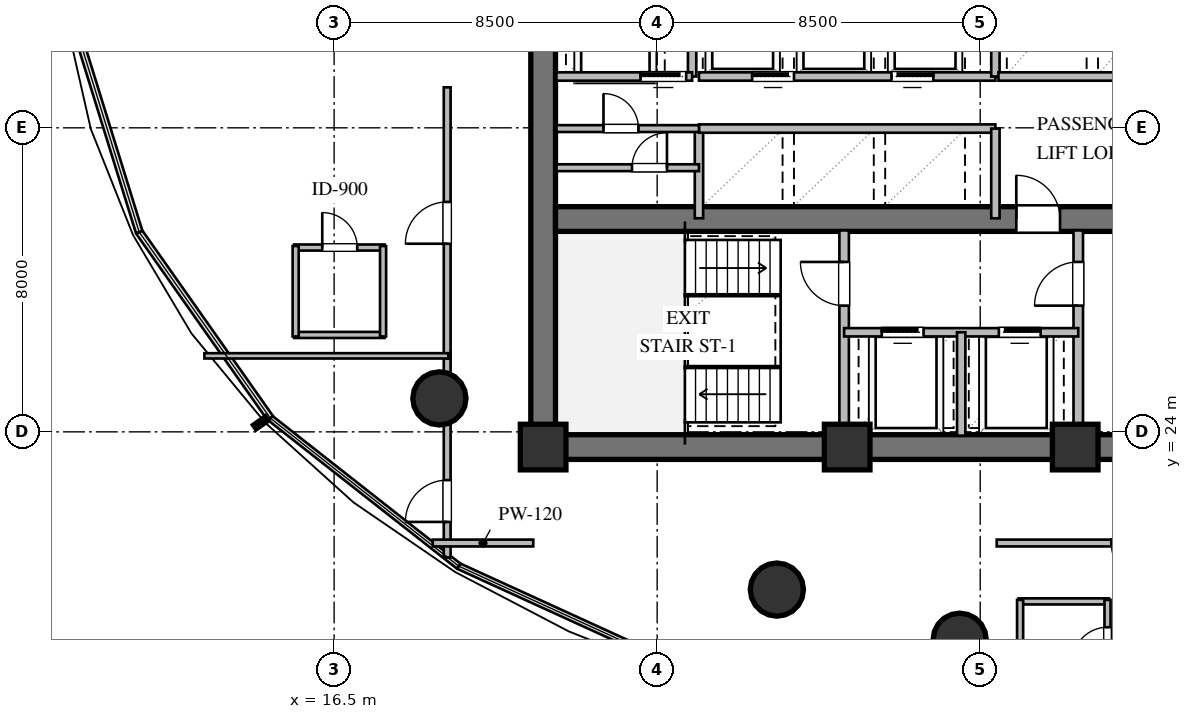
"""IFC4 building model, lengths in metres.
Left out: names, types, materials, properties, quantities, classifications, styles, units other than length and angle.
Written with IfcOpenShell. Run it as: python <this file> out.ifc"""

import sys

from ifc_helpers import new_model, si_unit, direction, frame, frame_2d, origin, origin_2d, place, context, subcontext, project, spatial, rectangle, circle, extrude, element, fill, save


model = new_model("IFC4")
c1 = context("Model", 3, precision=1e-05, world=origin(), true_north=direction((0.0, 1.0)))
c2 = subcontext(c1, "Body", "Model", "MODEL_VIEW")
j1 = project(units=[si_unit("LENGTHUNIT", "METRE"), si_unit("PLANEANGLEUNIT", "RADIAN")], contexts=[c1])
p1 = place(None, origin())
s1 = spatial("IfcSite", under=j1, at=p1, CompositionType="ELEMENT")
p2 = place(p1, origin())
s2 = spatial("IfcBuilding", under=s1, at=p2, CompositionType="ELEMENT")
p3 = place(p2, frame((0.0, 0.0, 24.0)))
s3 = spatial("IfcBuildingStorey", under=s2, at=p3, CompositionType="ELEMENT", Elevation=24.0)
p4 = place(p3, frame((21.675, 23.6, 0.0), z_axis=(0.0, 0.0, 1.0), x_axis=(1.0, 0.0, 0.0)))
e1 = element("IfcWall", 1, at=p4, inside=s3, PredefinedType="SHEAR", context=c2, shape_type="SweptSolid", body=[
    extrude(rectangle(XDim=22.65, YDim=0.65, at=frame_2d((11.325, 0.0))), origin(), (0.0, 0.0, 1.0), 3.36),
])
p5 = place(p3, frame((22.0, 23.925, 0.0), z_axis=(0.0, 0.0, 1.0), x_axis=(0.0, 1.0, 0.0)))
e2 = element("IfcWall", 2, at=p5, inside=s3, PredefinedType="SHEAR", context=c2, shape_type="SweptSolid", body=[
    extrude(rectangle(XDim=12.15, YDim=0.65, at=frame_2d((6.075, 0.0))), origin(), (0.0, 0.0, 1.0), 3.36),
])
p6 = place(p3, frame((22.325, 29.6, 0.0), z_axis=(0.0, 0.0, 1.0), x_axis=(1.0, 0.0, 0.0)))
e3 = element("IfcWall", 3, at=p6, inside=s3, PredefinedType="SHEAR", context=c2, shape_type="SweptSolid", body=[
    extrude(rectangle(XDim=21.35, YDim=0.65, at=frame_2d((10.675, 0.0))), origin(), (0.0, 0.0, 1.0), 3.36),
])
p7 = place(p6, frame((12.125, 0.0, 0.0)))
e4 = element("IfcOpeningElement", 4, at=p7, cuts=e3, PredefinedType="OPENING", context=c2, shape_type="SweptSolid", body=[
    extrude(rectangle(XDim=1.15, YDim=2.1, at=frame_2d((0.575, 1.05))), frame((0.0, 0.335, 0.0), z_axis=(0.0, -1.0, 0.0), x_axis=(1.0, 0.0, 0.0)), (0.0, 0.0, 1.0), 0.67),
])
for number, where, z_axis, x_axis in (
    (5, (22.0, 23.6, 0.0), (0.0, 0.0, 1.0), (1.0, 0.0, 0.0)),
    (6, (30.0, 23.6, 0.0), (0.0, 0.0, 1.0), (1.0, 0.0, 0.0)),
    (7, (36.0, 23.6, 0.0), (0.0, 0.0, 1.0), (1.0, 0.0, 0.0)),
):
    element("IfcColumn", number, at=place(p3, frame(where, z_axis=z_axis, x_axis=x_axis)), inside=s3, PredefinedType="COLUMN", context=c2, shape_type="SweptSolid", body=[
        extrude(rectangle(XDim=1.2, YDim=1.2, at=origin_2d()), origin(), (0.0, 0.0, 1.0), 3.6),
    ])
for number, where, z_axis, x_axis in (
    (8, (19.27, 24.88, 0.0), (0.0, 0.0, 1.0), (1.0, 0.0, 0.0)),
    (9, (28.15, 19.85, 0.0), (0.0, 0.0, 1.0), (1.0, 0.0, 0.0)),
    (10, (32.96, 18.53, 0.0), (0.0, 0.0, 1.0), (1.0, 0.0, 0.0)),
):
    element("IfcColumn", number, at=place(p3, frame(where, z_axis=z_axis, x_axis=x_axis)), inside=s3, PredefinedType="COLUMN", context=c2, shape_type="SweptSolid", body=[
        extrude(circle(Radius=0.7, at=origin_2d()), origin(), (0.0, 0.0, 1.0), 3.6),
    ])
p8 = place(p3, frame((29.92, 23.9, 0.0), z_axis=(0.0, 0.0, 1.0), x_axis=(0.0, 1.0, 0.0)))
e11 = element("IfcWall", 11, at=p8, inside=s3, PredefinedType="SOLIDWALL", context=c2, shape_type="SweptSolid", body=[
    extrude(rectangle(XDim=5.4, YDim=0.25, at=frame_2d((2.7, 0.0))), origin(), (0.0, 0.0, 1.0), 3.36),
])
p9 = place(p8, frame((3.421, 0.0, 0.0)))
e12 = element("IfcOpeningElement", 12, at=p9, cuts=e11, PredefinedType="OPENING", context=c2, shape_type="SweptSolid", body=[
    extrude(rectangle(XDim=1.15, YDim=2.1, at=frame_2d((0.575, 1.05))), frame((0.0, 0.135, 0.0), z_axis=(0.0, -1.0, 0.0), x_axis=(1.0, 0.0, 0.0)), (0.0, 0.0, 1.0), 0.27),
])
p10 = place(p3, frame((36.08, 23.9, 0.0), z_axis=(0.0, 0.0, 1.0), x_axis=(0.0, 1.0, 0.0)))
e13 = element("IfcWall", 13, at=p10, inside=s3, PredefinedType="SOLIDWALL", context=c2, shape_type="SweptSolid", body=[
    extrude(rectangle(XDim=5.4, YDim=0.25, at=frame_2d((2.7, 0.0))), origin(), (0.0, 0.0, 1.0), 3.36),
])
p11 = place(p10, frame((3.421, 0.0, 0.0)))
e14 = element("IfcOpeningElement", 14, at=p11, cuts=e13, PredefinedType="OPENING", context=c2, shape_type="SweptSolid", body=[
    extrude(rectangle(XDim=1.15, YDim=2.1, at=frame_2d((0.575, 1.05))), frame((0.0, 0.135, 0.0), z_axis=(0.0, -1.0, 0.0), x_axis=(1.0, 0.0, 0.0)), (0.0, 0.0, 1.0), 0.27),
])
p12 = place(p3, frame((29.92, 26.62, 0.0), z_axis=(0.0, 0.0, 1.0), x_axis=(1.0, 0.0, 0.0)))
e15 = element("IfcWall", 15, at=p12, inside=s3, PredefinedType="SOLIDWALL", context=c2, shape_type="SweptSolid", body=[
    extrude(rectangle(XDim=6.16, YDim=0.22, at=frame_2d((3.08, 0.0))), origin(), (0.0, 0.0, 1.0), 3.36),
])
p13 = place(p12, frame((0.99, 0.0, 0.0)))
e16 = element("IfcOpeningElement", 16, at=p13, cuts=e15, PredefinedType="OPENING", context=c2, shape_type="SweptSolid", body=[
    extrude(rectangle(XDim=1.1, YDim=2.1, at=frame_2d((0.55, 1.05))), frame((0.0, 0.12, 0.0), z_axis=(0.0, -1.0, 0.0), x_axis=(1.0, 0.0, 0.0)), (0.0, 0.0, 1.0), 0.24),
])
p14 = place(p12, frame((4.07, 0.0, 0.0)))
e17 = element("IfcOpeningElement", 17, at=p14, cuts=e15, PredefinedType="OPENING", context=c2, shape_type="SweptSolid", body=[
    extrude(rectangle(XDim=1.1, YDim=2.1, at=frame_2d((0.55, 1.05))), frame((0.0, 0.12, 0.0), z_axis=(0.0, -1.0, 0.0), x_axis=(1.0, 0.0, 0.0)), (0.0, 0.0, 1.0), 0.24),
])
p15 = place(p3, frame((33.0, 23.9, 0.0), z_axis=(0.0, 0.0, 1.0), x_axis=(0.0, 1.0, 0.0)))
e18 = element("IfcWall", 18, at=p15, inside=s3, PredefinedType="SOLIDWALL", context=c2, shape_type="SweptSolid", body=[
    extrude(rectangle(XDim=2.72, YDim=0.22, at=frame_2d((1.36, 0.0))), origin(), (0.0, 0.0, 1.0), 3.36),
])
p16 = place(p3, frame((25.92, 33.35, 0.0), z_axis=(0.0, 0.0, 1.0), x_axis=(0.0, 1.0, 0.0)))
e19 = element("IfcWall", 19, at=p16, inside=s3, PredefinedType="SOLIDWALL", context=c2, shape_type="SweptSolid", body=[
    extrude(rectangle(XDim=2.73, YDim=0.22, at=frame_2d((1.365, 0.0))), origin(), (0.0, 0.0, 1.0), 3.36),
])
p17 = place(p3, frame((22.35, 33.35, 0.0), z_axis=(0.0, 0.0, 1.0), x_axis=(1.0, 0.0, 0.0)))
e20 = element("IfcWall", 20, at=p17, inside=s3, PredefinedType="SOLIDWALL", context=c2, shape_type="SweptSolid", body=[
    extrude(rectangle(XDim=3.57, YDim=0.22, at=frame_2d((1.785, 0.0))), origin(), (0.0, 0.0, 1.0), 3.36),
])
p18 = place(p17, frame((2.213, 0.0, 0.0)))
e21 = element("IfcOpeningElement", 21, at=p18, cuts=e20, PredefinedType="OPENING", context=c2, shape_type="SweptSolid", body=[
    extrude(rectangle(XDim=1.2, YDim=2.1, at=frame_2d((0.6, 1.05))), frame((0.0, 0.12, 0.0), z_axis=(0.0, -1.0, 0.0), x_axis=(1.0, 0.0, 0.0)), (0.0, 0.0, 1.0), 0.24),
])
p19 = place(p3, frame((26.1, 29.62, 0.0), z_axis=(0.0, 0.0, 1.0), x_axis=(0.0, 1.0, 0.0)))
e22 = element("IfcWall", 22, at=p19, inside=s3, PredefinedType="SOLIDWALL", context=c2, shape_type="SweptSolid", body=[
    extrude(rectangle(XDim=2.36, YDim=0.22, at=frame_2d((1.18, 0.0))), origin(), (0.0, 0.0, 1.0), 3.36),
])
p20 = place(p3, frame((26.1, 31.98, 0.0), z_axis=(0.0, 0.0, 1.0), x_axis=(1.0, 0.0, 0.0)))
e23 = element("IfcWall", 23, at=p20, inside=s3, PredefinedType="SOLIDWALL", context=c2, shape_type="SweptSolid", body=[
    extrude(rectangle(XDim=7.8, YDim=0.22, at=frame_2d((3.9, 0.0))), origin(), (0.0, 0.0, 1.0), 3.36),
])
p21 = place(p3, frame((33.9, 29.62, 0.0), z_axis=(0.0, 0.0, 1.0), x_axis=(0.0, 1.0, 0.0)))
e24 = element("IfcWall", 24, at=p21, inside=s3, PredefinedType="SOLIDWALL", context=c2, shape_type="SweptSolid", body=[
    extrude(rectangle(XDim=2.36, YDim=0.22, at=frame_2d((1.18, 0.0))), origin(), (0.0, 0.0, 1.0), 3.36),
])
p22 = place(p3, frame((26.1, 33.35, 0.0), z_axis=(0.0, 0.0, 1.0), x_axis=(1.0, 0.0, 0.0)))
e25 = element("IfcWall", 25, at=p22, inside=s3, PredefinedType="SOLIDWALL", context=c2, shape_type="SweptSolid", body=[
    extrude(rectangle(XDim=7.8, YDim=0.22, at=frame_2d((3.9, 0.0))), origin(), (0.0, 0.0, 1.0), 3.36),
])
p23 = place(p22, frame((1.4, 0.0, 0.0)))
e26 = element("IfcOpeningElement", 26, at=p23, cuts=e25, PredefinedType="OPENING", context=c2, shape_type="SweptSolid", body=[
    extrude(rectangle(XDim=1.1, YDim=2.1, at=frame_2d((0.55, 1.05))), frame((0.0, 0.12, 0.0), z_axis=(0.0, -1.0, 0.0), x_axis=(1.0, 0.0, 0.0)), (0.0, 0.0, 1.0), 0.24),
])
p24 = place(p22, frame((5.066, 0.0, 0.0)))
e27 = element("IfcOpeningElement", 27, at=p24, cuts=e25, PredefinedType="OPENING", context=c2, shape_type="SweptSolid", body=[
    extrude(rectangle(XDim=1.1, YDim=2.1, at=frame_2d((0.55, 1.05))), frame((0.0, 0.12, 0.0), z_axis=(0.0, -1.0, 0.0), x_axis=(1.0, 0.0, 0.0)), (0.0, 0.0, 1.0), 0.24),
])
p25 = place(p3, frame((33.9, 33.35, 0.0), z_axis=(0.0, 0.0, 1.0), x_axis=(0.0, 1.0, 0.0)))
e28 = element("IfcWall", 28, at=p25, inside=s3, PredefinedType="SOLIDWALL", context=c2, shape_type="SweptSolid", body=[
    extrude(rectangle(XDim=2.73, YDim=0.22, at=frame_2d((1.365, 0.0))), origin(), (0.0, 0.0, 1.0), 3.36),
])
p26 = place(p3, frame((33.98, 33.35, 0.0), z_axis=(0.0, 0.0, 1.0), x_axis=(1.0, 0.0, 0.0)))
e29 = element("IfcWall", 29, at=p26, inside=s3, PredefinedType="SOLIDWALL", context=c2, shape_type="SweptSolid", body=[
    extrude(rectangle(XDim=7.54, YDim=0.22, at=frame_2d((3.77, 0.0))), origin(), (0.0, 0.0, 1.0), 3.36),
])
p27 = place(p3, frame((22.35, 30.95, 0.0), z_axis=(0.0, 0.0, 1.0), x_axis=(1.0, 0.0, 0.0)))
e30 = element("IfcWall", 30, at=p27, inside=s3, PredefinedType="PARTITIONING", context=c2, shape_type="SweptSolid", body=[
    extrude(rectangle(XDim=3.75, YDim=0.18, at=frame_2d((1.875, 0.0))), origin(), (0.0, 0.0, 1.0), 3.36),
])
p28 = place(p27, frame((1.988, 0.0, 0.0)))
e31 = element("IfcOpeningElement", 31, at=p28, cuts=e30, PredefinedType="OPENING", context=c2, shape_type="SweptSolid", body=[
    extrude(rectangle(XDim=0.92, YDim=2.1, at=frame_2d((0.46, 1.05))), frame((0.0, 0.1, 0.0), z_axis=(0.0, -1.0, 0.0), x_axis=(1.0, 0.0, 0.0)), (0.0, 0.0, 1.0), 0.2),
])
p29 = place(p3, frame((22.35, 31.98, 0.0), z_axis=(0.0, 0.0, 1.0), x_axis=(1.0, 0.0, 0.0)))
e32 = element("IfcWall", 32, at=p29, inside=s3, PredefinedType="PARTITIONING", context=c2, shape_type="SweptSolid", body=[
    extrude(rectangle(XDim=3.75, YDim=0.18, at=frame_2d((1.875, 0.0))), origin(), (0.0, 0.0, 1.0), 3.36),
])
p30 = place(p29, frame((1.238, 0.0, 0.0)))
e33 = element("IfcOpeningElement", 33, at=p30, cuts=e32, PredefinedType="OPENING", context=c2, shape_type="SweptSolid", body=[
    extrude(rectangle(XDim=0.92, YDim=2.1, at=frame_2d((0.46, 1.05))), frame((0.0, 0.1, 0.0), z_axis=(0.0, -1.0, 0.0), x_axis=(1.0, 0.0, 0.0)), (0.0, 0.0, 1.0), 0.2),
])
p31 = place(p3, frame((34.51, 19.539, 0.0), z_axis=(0.0, 0.0, 1.0), x_axis=(1.0, 0.0, 0.0)))
e34 = element("IfcWall", 34, at=p31, inside=s3, PredefinedType="PLUMBINGWALL", context=c2, shape_type="SweptSolid", body=[
    extrude(rectangle(XDim=2.38, YDim=0.16, at=frame_2d((1.19, 0.0))), origin(), (0.0, 0.0, 1.0), 3.36),
])
p32 = place(p3, frame((34.55, 17.199, 0.0), z_axis=(0.0, 0.0, 1.0), x_axis=(0.0, 1.0, 0.0)))
e35 = element("IfcWall", 35, at=p32, inside=s3, PredefinedType="PLUMBINGWALL", context=c2, shape_type="SweptSolid", body=[
    extrude(rectangle(XDim=2.38, YDim=0.16, at=frame_2d((1.19, 0.0))), origin(), (0.0, 0.0, 1.0), 3.36),
])
p33 = place(p3, frame((36.85, 17.199, 0.0), z_axis=(0.0, 0.0, 1.0), x_axis=(0.0, 1.0, 0.0)))
e36 = element("IfcWall", 36, at=p33, inside=s3, PredefinedType="PLUMBINGWALL", context=c2, shape_type="SweptSolid", body=[
    extrude(rectangle(XDim=2.38, YDim=0.16, at=frame_2d((1.19, 0.0))), origin(), (0.0, 0.0, 1.0), 3.36),
])
p34 = place(p33, frame((0.74, 0.0, 0.0)))
e37 = element("IfcOpeningElement", 37, at=p34, cuts=e36, PredefinedType="OPENING", context=c2, shape_type="SweptSolid", body=[
    extrude(rectangle(XDim=0.92, YDim=2.1, at=frame_2d((0.46, 1.05))), frame((0.0, 0.09, 0.0), z_axis=(0.0, -1.0, 0.0), x_axis=(1.0, 0.0, 0.0)), (0.0, 0.0, 1.0), 0.18),
])
p35 = place(p3, frame((15.448, 26.55, 0.0), z_axis=(0.0, 0.0, 1.0), x_axis=(1.0, 0.0, 0.0)))
e38 = element("IfcWall", 38, at=p35, inside=s3, PredefinedType="PLUMBINGWALL", context=c2, shape_type="SweptSolid", body=[
    extrude(rectangle(XDim=2.38, YDim=0.16, at=frame_2d((1.19, 0.0))), origin(), (0.0, 0.0, 1.0), 3.36),
])
p36 = place(p3, frame((15.448, 28.85, 0.0), z_axis=(0.0, 0.0, 1.0), x_axis=(1.0, 0.0, 0.0)))
e39 = element("IfcWall", 39, at=p36, inside=s3, PredefinedType="PLUMBINGWALL", context=c2, shape_type="SweptSolid", body=[
    extrude(rectangle(XDim=2.38, YDim=0.16, at=frame_2d((1.19, 0.0))), origin(), (0.0, 0.0, 1.0), 3.36),
])
p37 = place(p36, frame((0.74, 0.0, 0.0)))
e40 = element("IfcOpeningElement", 40, at=p37, cuts=e39, PredefinedType="OPENING", context=c2, shape_type="SweptSolid", body=[
    extrude(rectangle(XDim=0.92, YDim=2.1, at=frame_2d((0.46, 1.05))), frame((0.0, 0.09, 0.0), z_axis=(0.0, -1.0, 0.0), x_axis=(1.0, 0.0, 0.0)), (0.0, 0.0, 1.0), 0.18),
])
p38 = place(p3, frame((15.488, 26.51, 0.0), z_axis=(0.0, 0.0, 1.0), x_axis=(0.0, 1.0, 0.0)))
e41 = element("IfcWall", 41, at=p38, inside=s3, PredefinedType="PLUMBINGWALL", context=c2, shape_type="SweptSolid", body=[
    extrude(rectangle(XDim=2.38, YDim=0.16, at=frame_2d((1.19, 0.0))), origin(), (0.0, 0.0, 1.0), 3.36),
])
p39 = place(p3, frame((17.788, 26.51, 0.0), z_axis=(0.0, 0.0, 1.0), x_axis=(0.0, 1.0, 0.0)))
e42 = element("IfcWall", 42, at=p39, inside=s3, PredefinedType="PLUMBINGWALL", context=c2, shape_type="SweptSolid", body=[
    extrude(rectangle(XDim=2.38, YDim=0.16, at=frame_2d((1.19, 0.0))), origin(), (0.0, 0.0, 1.0), 2.738),
])
p40 = place(p3, frame((41.065, 21.075, 0.0), z_axis=(0.0, 0.0, 1.0), x_axis=(-1.0, 0.0, 0.0)))
e43 = element("IfcWall", 43, at=p40, inside=s3, PredefinedType="PARTITIONING", context=c2, shape_type="SweptSolid", body=[
    extrude(rectangle(XDim=7.13, YDim=0.18, at=frame_2d((3.565, 0.0))), origin(), (0.0, 0.0, 1.0), 2.996),
])
p41 = place(p40, frame((3.015, 0.0, 0.0)))
e44 = element("IfcOpeningElement", 44, at=p41, cuts=e43, PredefinedType="OPENING", context=c2, shape_type="SweptSolid", body=[
    extrude(rectangle(XDim=1.1, YDim=2.1, at=frame_2d((0.55, 1.05))), frame((0.0, 0.1, 0.0), z_axis=(0.0, -1.0, 0.0), x_axis=(1.0, 0.0, 0.0)), (0.0, 0.0, 1.0), 0.2),
])
p42 = place(p3, frame((19.475, 20.695, 0.0), z_axis=(0.0, 0.0, 1.0), x_axis=(0.0, 1.0, 0.0)))
e45 = element("IfcWall", 45, at=p42, inside=s3, PredefinedType="PARTITIONING", context=c2, shape_type="SweptSolid", body=[
    extrude(rectangle(XDim=5.37, YDim=0.18, at=frame_2d((2.685, 0.0))), origin(), (0.0, 0.0, 1.0), 2.738),
])
p43 = place(p42, frame((0.935, 0.0, 0.0)))
e46 = element("IfcOpeningElement", 46, at=p43, cuts=e45, PredefinedType="OPENING", context=c2, shape_type="SweptSolid", body=[
    extrude(rectangle(XDim=1.1, YDim=2.1, at=frame_2d((0.55, 1.05))), frame((0.0, 0.1, 0.0), z_axis=(0.0, -1.0, 0.0), x_axis=(1.0, 0.0, 0.0)), (0.0, 0.0, 1.0), 0.2),
])
p44 = place(p3, frame((21.74, 21.075, 0.0), z_axis=(0.0, 0.0, 1.0), x_axis=(-1.0, 0.0, 0.0)))
e47 = element("IfcWall", 47, at=p44, inside=s3, PredefinedType="PARTITIONING", context=c2, shape_type="SweptSolid", body=[
    extrude(rectangle(XDim=2.645, YDim=0.18, at=frame_2d((1.323, 0.0))), origin(), (0.0, 0.0, 1.0), 3.36),
])
p45 = place(p3, frame((19.475, 25.935, 0.0), z_axis=(0.0, 0.0, 1.0), x_axis=(0.0, 1.0, 0.0)))
e48 = element("IfcWall", 48, at=p45, inside=s3, PredefinedType="PARTITIONING", context=c2, shape_type="SweptSolid", body=[
    extrude(rectangle(XDim=7.13, YDim=0.18, at=frame_2d((3.565, 0.0))), origin(), (0.0, 0.0, 1.0), 2.738),
])
p46 = place(p45, frame((3.015, 0.0, 0.0)))
e49 = element("IfcOpeningElement", 49, at=p46, cuts=e48, PredefinedType="OPENING", context=c2, shape_type="SweptSolid", body=[
    extrude(rectangle(XDim=1.1, YDim=2.1, at=frame_2d((0.55, 1.05))), frame((0.0, 0.1, 0.0), z_axis=(0.0, -1.0, 0.0), x_axis=(1.0, 0.0, 0.0)), (0.0, 0.0, 1.0), 0.2),
])
p47 = place(p3, frame((13.087, 26.0, 0.0), z_axis=(0.0, 0.0, 1.0), x_axis=(1.0, 0.0, 0.0)))
e50 = element("IfcWall", 50, at=p47, inside=s3, PredefinedType="PARTITIONING", context=c2, shape_type="SweptSolid", body=[
    extrude(rectangle(XDim=6.418, YDim=0.14, at=frame_2d((3.209, 0.0))), origin(), (0.0, 0.0, 1.0), 3.36),
])
p48 = place(p9, origin())
e51 = element("IfcDoor", 51, at=p48, inside=s3, OperationType="SINGLE_SWING_RIGHT", PredefinedType="DOOR", context=c2, shape_type="SweptSolid", body=[
    extrude(rectangle(XDim=1.15, YDim=2.1, at=frame_2d((0.575, 1.05))), frame((0.0, 0.025, 0.0), z_axis=(0.0, -1.0, 0.0), x_axis=(1.0, 0.0, 0.0)), (0.0, 0.0, 1.0), 0.05),
])
fill(e12, e51)
p49 = place(p11, origin())
e52 = element("IfcDoor", 52, at=p49, inside=s3, OperationType="SINGLE_SWING_LEFT", PredefinedType="DOOR", context=c2, shape_type="SweptSolid", body=[
    extrude(rectangle(XDim=1.15, YDim=2.1, at=frame_2d((0.575, 1.05))), frame((0.0, 0.025, 0.0), z_axis=(0.0, -1.0, 0.0), x_axis=(1.0, 0.0, 0.0)), (0.0, 0.0, 1.0), 0.05),
])
fill(e14, e52)
p50 = place(p13, origin())
e53 = element("IfcDoor", 53, at=p50, inside=s3, OperationType="SLIDING_TO_LEFT", PredefinedType="DOOR", context=c2, shape_type="SweptSolid", body=[
    extrude(rectangle(XDim=1.1, YDim=2.1, at=frame_2d((0.55, 1.05))), frame((0.0, 0.025, 0.0), z_axis=(0.0, -1.0, 0.0), x_axis=(1.0, 0.0, 0.0)), (0.0, 0.0, 1.0), 0.05),
])
fill(e16, e53)
p51 = place(p14, origin())
e54 = element("IfcDoor", 54, at=p51, inside=s3, OperationType="SLIDING_TO_RIGHT", PredefinedType="DOOR", context=c2, shape_type="SweptSolid", body=[
    extrude(rectangle(XDim=1.1, YDim=2.1, at=frame_2d((0.55, 1.05))), frame((0.0, 0.025, 0.0), z_axis=(0.0, -1.0, 0.0), x_axis=(1.0, 0.0, 0.0)), (0.0, 0.0, 1.0), 0.05),
])
fill(e17, e54)
p52 = place(p7, origin())
e55 = element("IfcDoor", 55, at=p52, inside=s3, OperationType="SINGLE_SWING_LEFT", PredefinedType="DOOR", context=c2, shape_type="SweptSolid", body=[
    extrude(rectangle(XDim=1.15, YDim=2.1, at=frame_2d((0.575, 1.05))), frame((0.0, 0.025, 0.0), z_axis=(0.0, -1.0, 0.0), x_axis=(1.0, 0.0, 0.0)), (0.0, 0.0, 1.0), 0.05),
])
fill(e4, e55)
p53 = place(p18, origin())
e56 = element("IfcDoor", 56, at=p53, inside=s3, OperationType="SLIDING_TO_LEFT", PredefinedType="DOOR", context=c2, shape_type="SweptSolid", body=[
    extrude(rectangle(XDim=1.2, YDim=2.1, at=frame_2d((0.6, 1.05))), frame((0.0, 0.025, 0.0), z_axis=(0.0, -1.0, 0.0), x_axis=(1.0, 0.0, 0.0)), (0.0, 0.0, 1.0), 0.05),
])
fill(e21, e56)
p54 = place(p23, origin())
e57 = element("IfcDoor", 57, at=p54, inside=s3, OperationType="SLIDING_TO_LEFT", PredefinedType="DOOR", context=c2, shape_type="SweptSolid", body=[
    extrude(rectangle(XDim=1.1, YDim=2.1, at=frame_2d((0.55, 1.05))), frame((0.0, 0.025, 0.0), z_axis=(0.0, -1.0, 0.0), x_axis=(1.0, 0.0, 0.0)), (0.0, 0.0, 1.0), 0.05),
])
fill(e26, e57)
p55 = place(p24, origin())
e58 = element("IfcDoor", 58, at=p55, inside=s3, OperationType="SLIDING_TO_RIGHT", PredefinedType="DOOR", context=c2, shape_type="SweptSolid", body=[
    extrude(rectangle(XDim=1.1, YDim=2.1, at=frame_2d((0.55, 1.05))), frame((0.0, 0.025, 0.0), z_axis=(0.0, -1.0, 0.0), x_axis=(1.0, 0.0, 0.0)), (0.0, 0.0, 1.0), 0.05),
])
fill(e27, e58)
p56 = place(p30, origin())
e59 = element("IfcDoor", 59, at=p56, inside=s3, OperationType="SINGLE_SWING_LEFT", PredefinedType="DOOR", context=c2, shape_type="SweptSolid", body=[
    extrude(rectangle(XDim=0.92, YDim=2.1, at=frame_2d((0.46, 1.05))), frame((0.0, 0.025, 0.0), z_axis=(0.0, -1.0, 0.0), x_axis=(1.0, 0.0, 0.0)), (0.0, 0.0, 1.0), 0.05),
])
fill(e33, e59)
p57 = place(p28, origin())
e60 = element("IfcDoor", 60, at=p57, inside=s3, OperationType="SINGLE_SWING_RIGHT", PredefinedType="DOOR", context=c2, shape_type="SweptSolid", body=[
    extrude(rectangle(XDim=0.92, YDim=2.1, at=frame_2d((0.46, 1.05))), frame((0.0, 0.025, 0.0), z_axis=(0.0, -1.0, 0.0), x_axis=(1.0, 0.0, 0.0)), (0.0, 0.0, 1.0), 0.05),
])
fill(e31, e60)
p58 = place(p34, origin())
e61 = element("IfcDoor", 61, at=p58, inside=s3, OperationType="SINGLE_SWING_LEFT", PredefinedType="DOOR", context=c2, shape_type="SweptSolid", body=[
    extrude(rectangle(XDim=0.92, YDim=2.1, at=frame_2d((0.46, 1.05))), frame((0.0, 0.025, 0.0), z_axis=(0.0, -1.0, 0.0), x_axis=(1.0, 0.0, 0.0)), (0.0, 0.0, 1.0), 0.05),
])
fill(e37, e61)
p59 = place(p37, origin())
e62 = element("IfcDoor", 62, at=p59, inside=s3, OperationType="SINGLE_SWING_LEFT", PredefinedType="DOOR", context=c2, shape_type="SweptSolid", body=[
    extrude(rectangle(XDim=0.92, YDim=2.1, at=frame_2d((0.46, 1.05))), frame((0.0, 0.025, 0.0), z_axis=(0.0, -1.0, 0.0), x_axis=(1.0, 0.0, 0.0)), (0.0, 0.0, 1.0), 0.05),
])
fill(e40, e62)
p60 = place(p41, origin())
e63 = element("IfcDoor", 63, at=p60, inside=s3, OperationType="SINGLE_SWING_LEFT", PredefinedType="DOOR", context=c2, shape_type="SweptSolid", body=[
    extrude(rectangle(XDim=1.1, YDim=2.1, at=frame_2d((0.55, 1.05))), frame((0.0, 0.025, 0.0), z_axis=(0.0, -1.0, 0.0), x_axis=(1.0, 0.0, 0.0)), (0.0, 0.0, 1.0), 0.05),
])
fill(e44, e63)
p61 = place(p43, origin())
e64 = element("IfcDoor", 64, at=p61, inside=s3, OperationType="SINGLE_SWING_LEFT", PredefinedType="DOOR", context=c2, shape_type="SweptSolid", body=[
    extrude(rectangle(XDim=1.1, YDim=2.1, at=frame_2d((0.55, 1.05))), frame((0.0, 0.025, 0.0), z_axis=(0.0, -1.0, 0.0), x_axis=(1.0, 0.0, 0.0)), (0.0, 0.0, 1.0), 0.05),
])
fill(e46, e64)
p62 = place(p46, origin())
e65 = element("IfcDoor", 65, at=p62, inside=s3, OperationType="SINGLE_SWING_LEFT", PredefinedType="DOOR", context=c2, shape_type="SweptSolid", body=[
    extrude(rectangle(XDim=1.1, YDim=2.1, at=frame_2d((0.55, 1.05))), frame((0.0, 0.025, 0.0), z_axis=(0.0, -1.0, 0.0), x_axis=(1.0, 0.0, 0.0)), (0.0, 0.0, 1.0), 0.05),
])
fill(e49, e65)
save(model, sys.argv[1])
